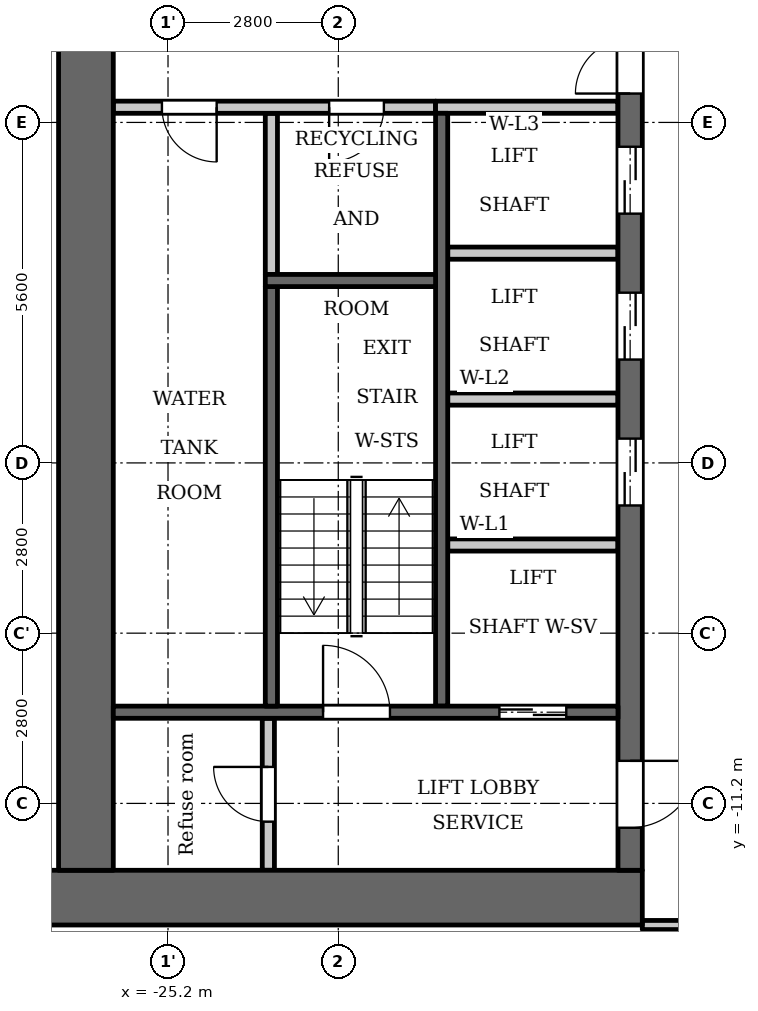
"""IFC4 building model, lengths in metres.
Left out: names, types, materials, properties, quantities, classifications, styles, units other than length and angle.
Written with IfcOpenShell. Run it as: python <this file> out.ifc"""

import sys

from ifc_helpers import new_model, si_unit, direction, frame, frame_2d, origin, place, context, subcontext, project, spatial, rectangle, extrude, element, fill, save


model = new_model("IFC4")
c1 = context("Model", 3, precision=1e-05, world=origin(), true_north=direction((0.0, 1.0)))
c2 = subcontext(c1, "Body", "Model", "MODEL_VIEW")
j1 = project(units=[si_unit("LENGTHUNIT", "METRE"), si_unit("PLANEANGLEUNIT", "RADIAN")], contexts=[c1])
p1 = place(None, origin())
s1 = spatial("IfcSite", under=j1, at=p1, CompositionType="ELEMENT")
p2 = place(p1, origin())
s2 = spatial("IfcBuilding", under=s1, at=p2, CompositionType="ELEMENT")
p3 = place(p2, frame((0.0, 0.0, 62.0)))
s3 = spatial("IfcBuildingStorey", under=s2, at=p3, CompositionType="ELEMENT", Elevation=62.0)
p4 = place(p3, frame((-23.5, -2.5, 0.0), z_axis=(0.0, 0.0, 1.0), x_axis=(0.0, 1.0, 0.0)))
e1 = element("IfcWall", 1, at=p4, inside=s3, PredefinedType="PARTITIONING", context=c2, shape_type="SweptSolid", body=[
    extrude(rectangle(XDim=2.65, YDim=0.2, at=frame_2d((1.325, 0.0))), origin(), (0.0, 0.0, 1.0), 3.2),
])
p5 = place(p3, frame((-20.7, -9.6, 0.0), z_axis=(0.0, 0.0, 1.0), x_axis=(0.0, 1.0, 0.0)))
e2 = element("IfcWall", 2, at=p5, inside=s3, PredefinedType="SHEAR", context=c2, shape_type="SweptSolid", body=[
    extrude(rectangle(XDim=9.75, YDim=0.2, at=frame_2d((4.875, 0.0))), origin(), (0.0, 0.0, 1.0), 3.2),
])
p6 = place(p3, frame((-20.8, 0.25, 0.0), z_axis=(0.0, 0.0, 1.0), x_axis=(-1.0, 0.0, 0.0)))
e3 = element("IfcWall", 3, at=p6, inside=s3, PredefinedType="PARTITIONING", context=c2, shape_type="SweptSolid", body=[
    extrude(rectangle(XDim=5.3, YDim=0.2, at=frame_2d((2.65, 0.0))), origin(), (0.0, 0.0, 1.0), 3.2),
])
p7 = place(p6, frame((0.85, 0.0, 0.0)))
e4 = element("IfcOpeningElement", 4, at=p7, cuts=e3, PredefinedType="OPENING", context=c2, shape_type="SweptSolid", body=[
    extrude(rectangle(XDim=0.9, YDim=2.1, at=frame_2d((0.45, 1.05))), frame((0.0, 0.11, 0.0), z_axis=(0.0, -1.0, 0.0), x_axis=(1.0, 0.0, 0.0)), (0.0, 0.0, 1.0), 0.22),
])
p8 = place(p6, frame((3.6, 0.0, 0.0)))
e5 = element("IfcOpeningElement", 5, at=p8, cuts=e3, PredefinedType="OPENING", context=c2, shape_type="SweptSolid", body=[
    extrude(rectangle(XDim=0.9, YDim=2.1, at=frame_2d((0.45, 1.05))), frame((0.0, 0.11, 0.0), z_axis=(0.0, -1.0, 0.0), x_axis=(1.0, 0.0, 0.0)), (0.0, 0.0, 1.0), 0.22),
])
p9 = place(p3, frame((-17.4, -12.75, 0.0), z_axis=(0.0, 0.0, 1.0), x_axis=(-1.0, 0.0, 0.0)))
e6 = element("IfcWall", 6, at=p9, inside=s3, PredefinedType="SHEAR", context=c2, shape_type="SweptSolid", body=[
    extrude(rectangle(XDim=10.4, YDim=0.9, at=frame_2d((5.2, 0.0))), origin(), (0.0, 0.0, 1.0), 3.2),
])
p10 = place(p3, frame((-17.6, -12.3, 0.0), z_axis=(0.0, 0.0, 1.0), x_axis=(0.0, 1.0, 0.0)))
e7 = element("IfcWall", 7, at=p10, inside=s3, PredefinedType="SHEAR", context=c2, shape_type="SweptSolid", body=[
    extrude(rectangle(XDim=24.6, YDim=0.4, at=frame_2d((12.3, 0.0))), origin(), (0.0, 0.0, 1.0), 3.2),
])
p11 = place(p10, frame((6.0, 0.0, 0.0)))
e8 = element("IfcOpeningElement", 8, at=p11, cuts=e7, PredefinedType="OPENING", context=c2, shape_type="SweptSolid", body=[
    extrude(rectangle(XDim=1.1, YDim=2.1, at=frame_2d((0.55, 1.05))), frame((0.0, 0.21, 0.0), z_axis=(0.0, -1.0, 0.0), x_axis=(1.0, 0.0, 0.0)), (0.0, 0.0, 1.0), 0.42),
])
p12 = place(p10, frame((8.4, 0.0, 0.0)))
e9 = element("IfcOpeningElement", 9, at=p12, cuts=e7, PredefinedType="OPENING", context=c2, shape_type="SweptSolid", body=[
    extrude(rectangle(XDim=1.1, YDim=2.1, at=frame_2d((0.55, 1.05))), frame((0.0, 0.21, 0.0), z_axis=(0.0, -1.0, 0.0), x_axis=(1.0, 0.0, 0.0)), (0.0, 0.0, 1.0), 0.42),
])
p13 = place(p10, frame((10.8, 0.0, 0.0)))
e10 = element("IfcOpeningElement", 10, at=p13, cuts=e7, PredefinedType="OPENING", context=c2, shape_type="SweptSolid", body=[
    extrude(rectangle(XDim=1.1, YDim=2.1, at=frame_2d((0.55, 1.05))), frame((0.0, 0.21, 0.0), z_axis=(0.0, -1.0, 0.0), x_axis=(1.0, 0.0, 0.0)), (0.0, 0.0, 1.0), 0.42),
])
p14 = place(p10, frame((16.75, 0.0, 0.0)))
e11 = element("IfcOpeningElement", 11, at=p14, cuts=e7, PredefinedType="OPENING", context=c2, shape_type="SweptSolid", body=[
    extrude(rectangle(XDim=0.9, YDim=2.1, at=frame_2d((0.45, 1.05))), frame((0.0, 0.21, 0.0), z_axis=(0.0, -1.0, 0.0), x_axis=(1.0, 0.0, 0.0)), (0.0, 0.0, 1.0), 0.42),
])
p15 = place(p10, frame((22.8, 0.0, 0.0)))
e12 = element("IfcOpeningElement", 12, at=p15, cuts=e7, PredefinedType="OPENING", context=c2, shape_type="SweptSolid", body=[
    extrude(rectangle(XDim=1.1, YDim=2.1, at=frame_2d((0.55, 1.05))), frame((0.0, 0.21, 0.0), z_axis=(0.0, -1.0, 0.0), x_axis=(1.0, 0.0, 0.0)), (0.0, 0.0, 1.0), 0.42),
])
p16 = place(p10, frame((0.7, 0.0, 0.0)))
e13 = element("IfcOpeningElement", 13, at=p16, cuts=e7, PredefinedType="OPENING", context=c2, shape_type="SweptSolid", body=[
    extrude(rectangle(XDim=1.1, YDim=2.1, at=frame_2d((0.55, 1.05))), frame((0.0, 0.21, 0.0), z_axis=(0.0, -1.0, 0.0), x_axis=(1.0, 0.0, 0.0)), (0.0, 0.0, 1.0), 0.42),
])
p17 = place(p10, frame((12.775, 0.0, 0.0)))
e14 = element("IfcOpeningElement", 14, at=p17, cuts=e7, PredefinedType="OPENING", context=c2, shape_type="SweptSolid", body=[
    extrude(rectangle(XDim=1.8, YDim=2.1, at=frame_2d((0.9, 1.05))), frame((0.0, 0.21, 0.0), z_axis=(0.0, -1.0, 0.0), x_axis=(1.0, 0.0, 0.0)), (0.0, 0.0, 1.0), 0.42),
])
p18 = place(p3, frame((-26.55, -12.3, 0.0), z_axis=(0.0, 0.0, 1.0), x_axis=(0.0, 1.0, 0.0)))
e15 = element("IfcWall", 15, at=p18, inside=s3, PredefinedType="SHEAR", context=c2, shape_type="SweptSolid", body=[
    extrude(rectangle(XDim=24.6, YDim=0.9, at=frame_2d((12.3, 0.0))), origin(), (0.0, 0.0, 1.0), 3.2),
])
p19 = place(p3, frame((-23.55, -12.3, 0.0), z_axis=(0.0, 0.0, 1.0), x_axis=(0.0, 1.0, 0.0)))
e16 = element("IfcWall", 16, at=p19, inside=s3, PredefinedType="PARTITIONING", context=c2, shape_type="SweptSolid", body=[
    extrude(rectangle(XDim=2.5, YDim=0.2, at=frame_2d((1.25, 0.0))), origin(), (0.0, 0.0, 1.0), 3.2),
])
p20 = place(p19, frame((0.8, 0.0, 0.0)))
e17 = element("IfcOpeningElement", 17, at=p20, cuts=e16, PredefinedType="OPENING", context=c2, shape_type="SweptSolid", body=[
    extrude(rectangle(XDim=0.9, YDim=2.1, at=frame_2d((0.45, 1.05))), frame((0.0, 0.11, 0.0), z_axis=(0.0, -1.0, 0.0), x_axis=(1.0, 0.0, 0.0)), (0.0, 0.0, 1.0), 0.22),
])
p21 = place(p3, frame((-17.8, -9.7, 0.0), z_axis=(0.0, 0.0, 1.0), x_axis=(-1.0, 0.0, 0.0)))
e18 = element("IfcWall", 18, at=p21, inside=s3, PredefinedType="SHEAR", context=c2, shape_type="SweptSolid", body=[
    extrude(rectangle(XDim=8.3, YDim=0.2, at=frame_2d((4.15, 0.0))), origin(), (0.0, 0.0, 1.0), 3.2),
])
p22 = place(p21, frame((0.85, 0.0, 0.0)))
e19 = element("IfcOpeningElement", 19, at=p22, cuts=e18, PredefinedType="OPENING", context=c2, shape_type="SweptSolid", body=[
    extrude(rectangle(XDim=1.1, YDim=2.1, at=frame_2d((0.55, 1.05))), frame((0.0, 0.11, 0.0), z_axis=(0.0, -1.0, 0.0), x_axis=(1.0, 0.0, 0.0)), (0.0, 0.0, 1.0), 0.22),
])
p23 = place(p21, frame((3.75, 0.0, 0.0)))
e20 = element("IfcOpeningElement", 20, at=p23, cuts=e18, PredefinedType="OPENING", context=c2, shape_type="SweptSolid", body=[
    extrude(rectangle(XDim=1.1, YDim=2.1, at=frame_2d((0.55, 1.05))), frame((0.0, 0.11, 0.0), z_axis=(0.0, -1.0, 0.0), x_axis=(1.0, 0.0, 0.0)), (0.0, 0.0, 1.0), 0.22),
])
for number, where, z_axis, x_axis in (
    (21, (-17.8, -6.95, 0.0), (0.0, 0.0, 1.0), (-1.0, 0.0, 0.0)),
    (22, (-17.8, -4.55, 0.0), (0.0, 0.0, 1.0), (-1.0, 0.0, 0.0)),
    (23, (-17.8, -2.15, 0.0), (0.0, 0.0, 1.0), (-1.0, 0.0, 0.0)),
):
    element("IfcWall", number, at=place(p3, frame(where, z_axis=z_axis, x_axis=x_axis)), inside=s3, PredefinedType="PARTITIONING", context=c2, shape_type="SweptSolid", body=[
        extrude(rectangle(XDim=2.8, YDim=0.2, at=frame_2d((1.4, 0.0))), origin(), (0.0, 0.0, 1.0), 3.2),
    ])
p24 = place(p3, frame((-17.8, 0.25, 0.0), z_axis=(0.0, 0.0, 1.0), x_axis=(-1.0, 0.0, 0.0)))
e24 = element("IfcWall", 24, at=p24, inside=s3, PredefinedType="PARTITIONING", context=c2, shape_type="SweptSolid", body=[
    extrude(rectangle(XDim=3.0, YDim=0.2, at=frame_2d((1.5, 0.0))), origin(), (0.0, 0.0, 1.0), 3.2),
])
p25 = place(p3, frame((-23.5, -9.6, 0.0), z_axis=(0.0, 0.0, 1.0), x_axis=(0.0, 1.0, 0.0)))
e25 = element("IfcWall", 25, at=p25, inside=s3, PredefinedType="SHEAR", context=c2, shape_type="SweptSolid", body=[
    extrude(rectangle(XDim=6.9, YDim=0.2, at=frame_2d((3.45, 0.0))), origin(), (0.0, 0.0, 1.0), 3.2),
])
p26 = place(p3, frame((-20.8, -2.6, 0.0), z_axis=(0.0, 0.0, 1.0), x_axis=(-1.0, 0.0, 0.0)))
e26 = element("IfcWall", 26, at=p26, inside=s3, PredefinedType="SHEAR", context=c2, shape_type="SweptSolid", body=[
    extrude(rectangle(XDim=2.8, YDim=0.2, at=frame_2d((1.4, 0.0))), origin(), (0.0, 0.0, 1.0), 3.2),
])
p27 = place(p3, frame((-17.4, -13.2, 0.0), z_axis=(0.0, 0.0, 1.0), x_axis=(1.0, 0.0, 0.0)))
e27 = element("IfcWall", 27, at=p27, inside=s3, PredefinedType="PARTITIONING", context=c2, shape_type="SweptSolid", body=[
    extrude(rectangle(XDim=34.8, YDim=0.15, at=frame_2d((17.4, 0.0))), origin(), (0.0, 0.0, 1.0), 3.2),
])
p28 = place(p27, frame((0.65, 0.0, 0.0)))
e28 = element("IfcOpeningElement", 28, at=p28, cuts=e27, PredefinedType="OPENING", context=c2, shape_type="SweptSolid", body=[
    extrude(rectangle(XDim=1.0, YDim=2.1, at=frame_2d((0.5, 1.05))), frame((0.0, 0.085, 0.0), z_axis=(0.0, -1.0, 0.0), x_axis=(1.0, 0.0, 0.0)), (0.0, 0.0, 1.0), 0.17),
])
p29 = place(p27, frame((33.05, 0.0, 0.0)))
e29 = element("IfcOpeningElement", 29, at=p29, cuts=e27, PredefinedType="OPENING", context=c2, shape_type="SweptSolid", body=[
    extrude(rectangle(XDim=1.0, YDim=2.1, at=frame_2d((0.5, 1.05))), frame((0.0, 0.085, 0.0), z_axis=(0.0, -1.0, 0.0), x_axis=(1.0, 0.0, 0.0)), (0.0, 0.0, 1.0), 0.17),
])
p30 = place(p27, frame((4.55, 0.0, 0.0)))
e30 = element("IfcOpeningElement", 30, at=p30, cuts=e27, PredefinedType="OPENING", context=c2, shape_type="SweptSolid", body=[
    extrude(rectangle(XDim=1.0, YDim=2.1, at=frame_2d((0.5, 1.05))), frame((0.0, 0.085, 0.0), z_axis=(0.0, -1.0, 0.0), x_axis=(1.0, 0.0, 0.0)), (0.0, 0.0, 1.0), 0.17),
])
p31 = place(p27, frame((15.75, 0.0, 0.0)))
e31 = element("IfcOpeningElement", 31, at=p31, cuts=e27, PredefinedType="OPENING", context=c2, shape_type="SweptSolid", body=[
    extrude(rectangle(XDim=1.0, YDim=2.1, at=frame_2d((0.5, 1.05))), frame((0.0, 0.085, 0.0), z_axis=(0.0, -1.0, 0.0), x_axis=(1.0, 0.0, 0.0)), (0.0, 0.0, 1.0), 0.17),
])
p32 = place(p27, frame((18.1, 0.0, 0.0)))
e32 = element("IfcOpeningElement", 32, at=p32, cuts=e27, PredefinedType="OPENING", context=c2, shape_type="SweptSolid", body=[
    extrude(rectangle(XDim=1.0, YDim=2.1, at=frame_2d((0.5, 1.05))), frame((0.0, 0.085, 0.0), z_axis=(0.0, -1.0, 0.0), x_axis=(1.0, 0.0, 0.0)), (0.0, 0.0, 1.0), 0.17),
])
p33 = place(p27, frame((26.95, 0.0, 0.0)))
e33 = element("IfcOpeningElement", 33, at=p33, cuts=e27, PredefinedType="OPENING", context=c2, shape_type="SweptSolid", body=[
    extrude(rectangle(XDim=1.0, YDim=2.1, at=frame_2d((0.5, 1.05))), frame((0.0, 0.085, 0.0), z_axis=(0.0, -1.0, 0.0), x_axis=(1.0, 0.0, 0.0)), (0.0, 0.0, 1.0), 0.17),
])
p34 = place(p22, origin())
e34 = element("IfcDoor", 34, at=p34, inside=s3, OperationType="DOUBLE_DOOR_SLIDING", PredefinedType="DOOR", context=c2, shape_type="SweptSolid", body=[
    extrude(rectangle(XDim=1.1, YDim=2.1, at=frame_2d((0.55, 1.05))), frame((0.0, 0.025, 0.0), z_axis=(0.0, -1.0, 0.0), x_axis=(1.0, 0.0, 0.0)), (0.0, 0.0, 1.0), 0.05),
])
fill(e19, e34)
p35 = place(p11, origin())
e35 = element("IfcDoor", 35, at=p35, inside=s3, OperationType="DOUBLE_DOOR_SLIDING", PredefinedType="DOOR", context=c2, shape_type="SweptSolid", body=[
    extrude(rectangle(XDim=1.1, YDim=2.1, at=frame_2d((0.55, 1.05))), frame((0.0, 0.025, 0.0), z_axis=(0.0, -1.0, 0.0), x_axis=(1.0, 0.0, 0.0)), (0.0, 0.0, 1.0), 0.05),
])
fill(e8, e35)
p36 = place(p12, origin())
e36 = element("IfcDoor", 36, at=p36, inside=s3, OperationType="DOUBLE_DOOR_SLIDING", PredefinedType="DOOR", context=c2, shape_type="SweptSolid", body=[
    extrude(rectangle(XDim=1.1, YDim=2.1, at=frame_2d((0.55, 1.05))), frame((0.0, 0.025, 0.0), z_axis=(0.0, -1.0, 0.0), x_axis=(1.0, 0.0, 0.0)), (0.0, 0.0, 1.0), 0.05),
])
fill(e9, e36)
p37 = place(p13, origin())
e37 = element("IfcDoor", 37, at=p37, inside=s3, OperationType="DOUBLE_DOOR_SLIDING", PredefinedType="DOOR", context=c2, shape_type="SweptSolid", body=[
    extrude(rectangle(XDim=1.1, YDim=2.1, at=frame_2d((0.55, 1.05))), frame((0.0, 0.025, 0.0), z_axis=(0.0, -1.0, 0.0), x_axis=(1.0, 0.0, 0.0)), (0.0, 0.0, 1.0), 0.05),
])
fill(e10, e37)
p38 = place(p16, origin())
e38 = element("IfcDoor", 38, at=p38, inside=s3, OperationType="SINGLE_SWING_RIGHT", PredefinedType="DOOR", context=c2, shape_type="SweptSolid", body=[
    extrude(rectangle(XDim=1.1, YDim=2.1, at=frame_2d((0.55, 1.05))), frame((0.0, 0.025, 0.0), z_axis=(0.0, -1.0, 0.0), x_axis=(1.0, 0.0, 0.0)), (0.0, 0.0, 1.0), 0.05),
])
fill(e13, e38)
p39 = place(p20, origin())
e39 = element("IfcDoor", 39, at=p39, inside=s3, OperationType="SINGLE_SWING_LEFT", PredefinedType="DOOR", context=c2, shape_type="SweptSolid", body=[
    extrude(rectangle(XDim=0.9, YDim=2.1, at=frame_2d((0.45, 1.05))), frame((0.0, 0.025, 0.0), z_axis=(0.0, -1.0, 0.0), x_axis=(1.0, 0.0, 0.0)), (0.0, 0.0, 1.0), 0.05),
])
fill(e17, e39)
p40 = place(p23, origin())
e40 = element("IfcDoor", 40, at=p40, inside=s3, OperationType="SINGLE_SWING_RIGHT", PredefinedType="DOOR", context=c2, shape_type="SweptSolid", body=[
    extrude(rectangle(XDim=1.1, YDim=2.1, at=frame_2d((0.55, 1.05))), frame((0.0, 0.025, 0.0), z_axis=(0.0, -1.0, 0.0), x_axis=(1.0, 0.0, 0.0)), (0.0, 0.0, 1.0), 0.05),
])
fill(e20, e40)
p41 = place(p17, origin())
e41 = element("IfcDoor", 41, at=p41, inside=s3, OperationType="DOUBLE_DOOR_SINGLE_SWING", PredefinedType="DOOR", context=c2, shape_type="SweptSolid", body=[
    extrude(rectangle(XDim=1.8, YDim=2.1, at=frame_2d((0.9, 1.05))), frame((0.0, 0.025, 0.0), z_axis=(0.0, -1.0, 0.0), x_axis=(1.0, 0.0, 0.0)), (0.0, 0.0, 1.0), 0.05),
])
fill(e14, e41)
p42 = place(p7, origin())
e42 = element("IfcDoor", 42, at=p42, inside=s3, OperationType="SINGLE_SWING_LEFT", PredefinedType="DOOR", context=c2, shape_type="SweptSolid", body=[
    extrude(rectangle(XDim=0.9, YDim=2.1, at=frame_2d((0.45, 1.05))), frame((0.0, 0.025, 0.0), z_axis=(0.0, -1.0, 0.0), x_axis=(1.0, 0.0, 0.0)), (0.0, 0.0, 1.0), 0.05),
])
fill(e4, e42)
p43 = place(p8, origin())
e43 = element("IfcDoor", 43, at=p43, inside=s3, OperationType="SINGLE_SWING_RIGHT", PredefinedType="DOOR", context=c2, shape_type="SweptSolid", body=[
    extrude(rectangle(XDim=0.9, YDim=2.1, at=frame_2d((0.45, 1.05))), frame((0.0, 0.025, 0.0), z_axis=(0.0, -1.0, 0.0), x_axis=(1.0, 0.0, 0.0)), (0.0, 0.0, 1.0), 0.05),
])
fill(e5, e43)
save(model, sys.argv[1])
